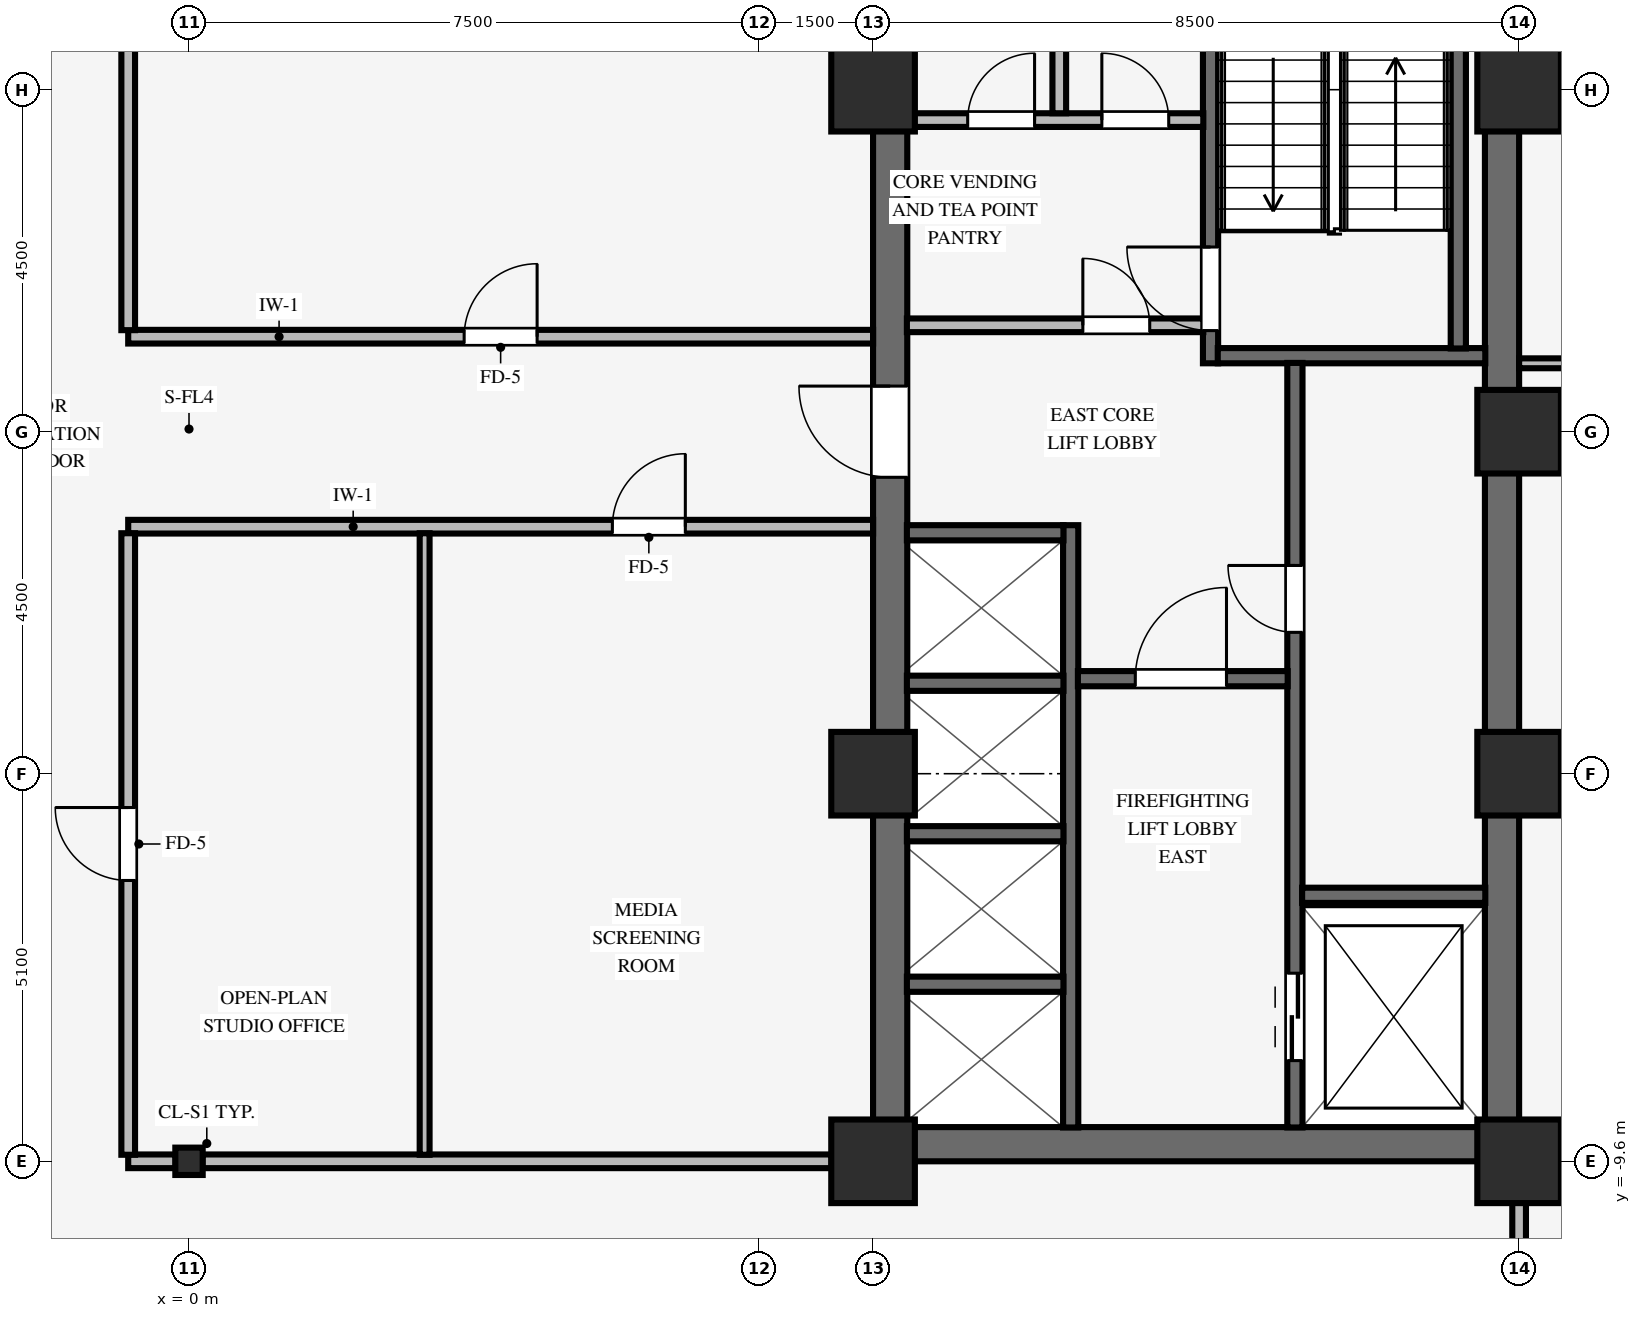
"""IFC4 building model, lengths in metres.
Left out: names, types, materials, properties, quantities, classifications, styles, units other than length and angle.
Written with IfcOpenShell. Run it as: python <this file> out.ifc"""

import sys

from ifc_helpers import new_model, si_unit, direction, frame, frame_2d, origin, origin_2d, place, context, subcontext, project, spatial, rectangle, i_section, extrude, source, transform, mapped, element, fill, save


model = new_model("IFC4")
c1 = context("Model", 3, precision=1e-05, world=origin(), true_north=direction((0.0, 1.0)))
c2 = subcontext(c1, "Body", "Model", "MODEL_VIEW")
j1 = project(units=[si_unit("LENGTHUNIT", "METRE"), si_unit("PLANEANGLEUNIT", "RADIAN")], contexts=[c1])
p1 = place(None, origin())
s1 = spatial("IfcSite", under=j1, at=p1, CompositionType="ELEMENT")
p2 = place(p1, origin())
s2 = spatial("IfcBuilding", under=s1, at=p2, CompositionType="ELEMENT")
p3 = place(p2, frame((0.0, 0.0, 64.1)))
s3 = spatial("IfcBuildingStorey", under=s2, at=p3, CompositionType="ELEMENT", Elevation=64.1)
p4 = place(p3, frame((9.0, -9.375, 0.0), z_axis=(0.0, 0.0, 1.0), x_axis=(1.0, 0.0, 0.0)))
e1 = element("IfcWall", 1, at=p4, inside=s3, PredefinedType="SHEAR", context=c2, shape_type="SweptSolid", body=[
    extrude(rectangle(XDim=8.5, YDim=0.45, at=frame_2d((4.25, 0.0))), origin(), (0.0, 0.0, 1.0), 3.37),
])
p5 = place(p3, frame((9.225, -9.155, 0.0), z_axis=(0.0, 0.0, 1.0), x_axis=(0.0, 1.0, 0.0)))
e2 = element("IfcWall", 2, at=p5, inside=s3, PredefinedType="SHEAR", context=c2, shape_type="SweptSolid", body=[
    extrude(rectangle(XDim=18.31, YDim=0.45, at=frame_2d((9.155, 0.0))), origin(), (0.0, 0.0, 1.0), 3.37),
])
p6 = place(p5, frame((8.555, 0.0, 0.0)))
e3 = element("IfcOpeningElement", 3, at=p6, cuts=e2, PredefinedType="OPENING", context=c2, shape_type="SweptSolid", body=[
    extrude(rectangle(XDim=1.2, YDim=2.15, at=frame_2d((0.6, 1.075))), frame((0.0, 0.235, 0.0), z_axis=(0.0, -1.0, 0.0), x_axis=(1.0, 0.0, 0.0)), (0.0, 0.0, 1.0), 0.47),
])
p7 = place(p3, frame((17.275, -9.155, 0.0), z_axis=(0.0, 0.0, 1.0), x_axis=(0.0, 1.0, 0.0)))
e4 = element("IfcWall", 4, at=p7, inside=s3, PredefinedType="SHEAR", context=c2, shape_type="SweptSolid", body=[
    extrude(rectangle(XDim=18.31, YDim=0.45, at=frame_2d((9.155, 0.0))), origin(), (0.0, 0.0, 1.0), 3.37),
])
for number, where, z_axis, x_axis in (
    (5, (9.0, -9.6, 0.0), (0.0, 0.0, 1.0), (1.0, 0.0, 0.0)),
    (6, (9.0, -4.5, 0.0), (0.0, 0.0, 1.0), (1.0, 0.0, 0.0)),
    (7, (9.0, 4.5, 0.0), (0.0, 0.0, 1.0), (1.0, 0.0, 0.0)),
    (8, (17.5, -9.6, 0.0), (0.0, 0.0, 1.0), (1.0, 0.0, 0.0)),
    (9, (17.5, -4.5, 0.0), (0.0, 0.0, 1.0), (1.0, 0.0, 0.0)),
    (10, (17.5, 4.5, 0.0), (0.0, 0.0, 1.0), (1.0, 0.0, 0.0)),
    (11, (17.5, 0.0, 0.0), (0.0, 0.0, 1.0), (1.0, 0.0, 0.0)),
):
    element("IfcColumn", number, at=place(p3, frame(where, z_axis=z_axis, x_axis=x_axis)), inside=s3, PredefinedType="COLUMN", context=c2, shape_type="SweptSolid", body=[
        extrude(rectangle(XDim=1.1, YDim=1.1, at=origin_2d()), origin(), (0.0, 0.0, 1.0), 3.37),
    ])
p8 = place(p3, frame((0.0, -9.6, 0.0), z_axis=(0.0, 0.0, 1.0), x_axis=(1.0, 0.0, 0.0)))
e12 = element("IfcColumn", 12, at=p8, inside=s3, PredefinedType="COLUMN", context=c2, shape_type="SweptSolid", body=[
    extrude(i_section(OverallWidth=0.36, OverallDepth=0.36, WebThickness=0.021, FlangeThickness=0.021, FilletRadius=0.018, at=origin_2d()), origin(), (0.0, 0.0, 1.0), 3.37),
])
p9 = place(p3, frame((13.44, 0.9, 0.0), z_axis=(0.0, 0.0, 1.0), x_axis=(0.0, 1.0, 0.0)))
e13 = element("IfcWall", 13, at=p9, inside=s3, PredefinedType="SHEAR", context=c2, shape_type="SweptSolid", body=[
    extrude(rectangle(XDim=8.255, YDim=0.2, at=frame_2d((4.127, 0.0))), origin(), (0.0, 0.0, 1.0), 3.37),
])
p10 = place(p9, frame((0.43, 0.0, 0.0)))
e14 = element("IfcOpeningElement", 14, at=p10, cuts=e13, PredefinedType="OPENING", context=c2, shape_type="SweptSolid", body=[
    extrude(rectangle(XDim=1.1, YDim=2.15, at=frame_2d((0.55, 1.075))), frame((0.0, 0.11, 0.0), z_axis=(0.0, -1.0, 0.0), x_axis=(1.0, 0.0, 0.0)), (0.0, 0.0, 1.0), 0.22),
])
p11 = place(p3, frame((13.535, 1.0, 0.0), z_axis=(0.0, 0.0, 1.0), x_axis=(1.0, 0.0, 0.0)))
e15 = element("IfcWall", 15, at=p11, inside=s3, PredefinedType="SHEAR", context=c2, shape_type="SweptSolid", body=[
    extrude(rectangle(XDim=3.52, YDim=0.2, at=frame_2d((1.76, 0.0))), origin(), (0.0, 0.0, 1.0), 3.37),
])
p12 = place(p3, frame((16.7, 1.095, 0.0), z_axis=(0.0, 0.0, 1.0), x_axis=(0.0, 1.0, 0.0)))
e16 = element("IfcWall", 16, at=p12, inside=s3, PredefinedType="SHEAR", context=c2, shape_type="SweptSolid", body=[
    extrude(rectangle(XDim=8.06, YDim=0.2, at=frame_2d((4.03, 0.0))), origin(), (0.0, 0.0, 1.0), 3.37),
])
p13 = place(p3, frame((14.55, -9.155, 0.0), z_axis=(0.0, 0.0, 1.0), x_axis=(0.0, 1.0, 0.0)))
e17 = element("IfcWall", 17, at=p13, inside=s3, PredefinedType="SHEAR", context=c2, shape_type="SweptSolid", body=[
    extrude(rectangle(XDim=10.06, YDim=0.2, at=frame_2d((5.03, 0.0))), origin(), (0.0, 0.0, 1.0), 3.37),
])
p14 = place(p13, frame((6.515, 0.0, 0.0)))
e18 = element("IfcOpeningElement", 18, at=p14, cuts=e17, PredefinedType="OPENING", context=c2, shape_type="SweptSolid", body=[
    extrude(rectangle(XDim=0.88, YDim=2.1, at=frame_2d((0.44, 1.05))), frame((0.0, 0.11, 0.0), z_axis=(0.0, -1.0, 0.0), x_axis=(1.0, 0.0, 0.0)), (0.0, 0.0, 1.0), 0.22),
])
p15 = place(p13, frame((0.88, 0.0, 0.0)))
e19 = element("IfcOpeningElement", 19, at=p15, cuts=e17, PredefinedType="OPENING", context=c2, shape_type="SweptSolid", body=[
    extrude(rectangle(XDim=1.15, YDim=2.15, at=frame_2d((0.575, 1.075))), frame((0.0, 0.11, 0.0), z_axis=(0.0, -1.0, 0.0), x_axis=(1.0, 0.0, 0.0)), (0.0, 0.0, 1.0), 0.22),
])
p16 = place(p3, frame((14.645, -6.1, 0.0), z_axis=(0.0, 0.0, 1.0), x_axis=(1.0, 0.0, 0.0)))
e20 = element("IfcWall", 20, at=p16, inside=s3, PredefinedType="SHEAR", context=c2, shape_type="SweptSolid", body=[
    extrude(rectangle(XDim=2.41, YDim=0.2, at=frame_2d((1.205, 0.0))), origin(), (0.0, 0.0, 1.0), 3.37),
])
p17 = place(p3, frame((11.6, -9.155, 0.0), z_axis=(0.0, 0.0, 1.0), x_axis=(0.0, 1.0, 0.0)))
e21 = element("IfcWall", 21, at=p17, inside=s3, PredefinedType="SHEAR", context=c2, shape_type="SweptSolid", body=[
    extrude(rectangle(XDim=7.925, YDim=0.2, at=frame_2d((3.962, 0.0))), origin(), (0.0, 0.0, 1.0), 3.37),
])
p18 = place(p3, frame((11.695, -3.25, 0.0), z_axis=(0.0, 0.0, 1.0), x_axis=(1.0, 0.0, 0.0)))
e22 = element("IfcWall", 22, at=p18, inside=s3, PredefinedType="SHEAR", context=c2, shape_type="SweptSolid", body=[
    extrude(rectangle(XDim=2.76, YDim=0.2, at=frame_2d((1.38, 0.0))), origin(), (0.0, 0.0, 1.0), 3.37),
])
p19 = place(p18, frame((0.755, 0.0, 0.0)))
e23 = element("IfcOpeningElement", 23, at=p19, cuts=e22, PredefinedType="OPENING", context=c2, shape_type="SweptSolid", body=[
    extrude(rectangle(XDim=1.2, YDim=2.15, at=frame_2d((0.6, 1.075))), frame((0.0, 0.11, 0.0), z_axis=(0.0, -1.0, 0.0), x_axis=(1.0, 0.0, 0.0)), (0.0, 0.0, 1.0), 0.22),
])
for number, where, z_axis, x_axis in (
    (24, (9.445, -7.27, 0.0), (0.0, 0.0, 1.0), (1.0, 0.0, 0.0)),
    (25, (9.445, -5.29, 0.0), (0.0, 0.0, 1.0), (1.0, 0.0, 0.0)),
    (26, (9.445, -3.31, 0.0), (0.0, 0.0, 1.0), (1.0, 0.0, 0.0)),
    (27, (9.445, -1.33, 0.0), (0.0, 0.0, 1.0), (1.0, 0.0, 0.0)),
):
    element("IfcWall", number, at=place(p3, frame(where, z_axis=z_axis, x_axis=x_axis)), inside=s3, PredefinedType="SHEAR", context=c2, shape_type="SweptSolid", body=[
        extrude(rectangle(XDim=2.06, YDim=0.2, at=frame_2d((1.03, 0.0))), origin(), (0.0, 0.0, 1.0), 3.37),
    ])
p20 = place(p3, frame((9.445, 1.4, 0.0), z_axis=(0.0, 0.0, 1.0), x_axis=(1.0, 0.0, 0.0)))
e28 = element("IfcWall", 28, at=p20, inside=s3, PredefinedType="PARTITIONING", context=c2, shape_type="SweptSolid", body=[
    extrude(rectangle(XDim=3.9, YDim=0.18, at=frame_2d((1.95, 0.0))), origin(), (0.0, 0.0, 1.0), 3.36),
])
p21 = place(p20, frame((2.315, 0.0, 0.0)))
e29 = element("IfcOpeningElement", 29, at=p21, cuts=e28, PredefinedType="OPENING", context=c2, shape_type="SweptSolid", body=[
    extrude(rectangle(XDim=0.88, YDim=2.1, at=frame_2d((0.44, 1.05))), frame((0.0, 0.1, 0.0), z_axis=(0.0, -1.0, 0.0), x_axis=(1.0, 0.0, 0.0)), (0.0, 0.0, 1.0), 0.2),
])
p22 = place(p3, frame((9.445, 4.1, 0.0), z_axis=(0.0, 0.0, 1.0), x_axis=(1.0, 0.0, 0.0)))
e30 = element("IfcWall", 30, at=p22, inside=s3, PredefinedType="PARTITIONING", context=c2, shape_type="SweptSolid", body=[
    extrude(rectangle(XDim=3.9, YDim=0.18, at=frame_2d((1.95, 0.0))), origin(), (0.0, 0.0, 1.0), 3.36),
])
p23 = place(p22, frame((0.8, 0.0, 0.0)))
e31 = element("IfcOpeningElement", 31, at=p23, cuts=e30, PredefinedType="OPENING", context=c2, shape_type="SweptSolid", body=[
    extrude(rectangle(XDim=0.88, YDim=2.1, at=frame_2d((0.44, 1.05))), frame((0.0, 0.1, 0.0), z_axis=(0.0, -1.0, 0.0), x_axis=(1.0, 0.0, 0.0)), (0.0, 0.0, 1.0), 0.2),
])
p24 = place(p22, frame((2.565, 0.0, 0.0)))
e32 = element("IfcOpeningElement", 32, at=p24, cuts=e30, PredefinedType="OPENING", context=c2, shape_type="SweptSolid", body=[
    extrude(rectangle(XDim=0.88, YDim=2.1, at=frame_2d((0.44, 1.05))), frame((0.0, 0.1, 0.0), z_axis=(0.0, -1.0, 0.0), x_axis=(1.0, 0.0, 0.0)), (0.0, 0.0, 1.0), 0.2),
])
p25 = place(p3, frame((11.45, 4.19, 0.0), z_axis=(0.0, 0.0, 1.0), x_axis=(0.0, 1.0, 0.0)))
e33 = element("IfcWall", 33, at=p25, inside=s3, PredefinedType="PARTITIONING", context=c2, shape_type="SweptSolid", body=[
    extrude(rectangle(XDim=4.965, YDim=0.18, at=frame_2d((2.482, 0.0))), origin(), (0.0, 0.0, 1.0), 3.36),
])
p26 = place(p3, frame((-0.8, -9.6, 0.0), z_axis=(0.0, 0.0, 1.0), x_axis=(1.0, 0.0, 0.0)))
e34 = element("IfcWall", 34, at=p26, inside=s3, PredefinedType="PARTITIONING", context=c2, shape_type="SweptSolid", body=[
    extrude(rectangle(XDim=0.624, YDim=0.18, at=frame_2d((0.312, 0.0))), origin(), (0.0, 0.0, 1.0), 2.405),
])
p27 = place(p3, frame((0.176, -9.6, 0.0), z_axis=(0.0, 0.0, 1.0), x_axis=(1.0, 0.0, 0.0)))
e35 = element("IfcWall", 35, at=p27, inside=s3, PredefinedType="PARTITIONING", context=c2, shape_type="SweptSolid", body=[
    extrude(rectangle(XDim=8.278, YDim=0.18, at=frame_2d((4.139, 0.0))), origin(), (0.0, 0.0, 1.0), 2.405),
])
p28 = place(p3, frame((-0.8, -1.25, 0.0), z_axis=(0.0, 0.0, 1.0), x_axis=(1.0, 0.0, 0.0)))
e36 = element("IfcWall", 36, at=p28, inside=s3, PredefinedType="PARTITIONING", context=c2, shape_type="SweptSolid", body=[
    extrude(rectangle(XDim=9.8, YDim=0.18, at=frame_2d((4.9, 0.0))), origin(), (0.0, 0.0, 1.0), 3.36),
])
p29 = place(p28, frame((6.37, 0.0, 0.0)))
e37 = element("IfcOpeningElement", 37, at=p29, cuts=e36, PredefinedType="OPENING", context=c2, shape_type="SweptSolid", body=[
    extrude(rectangle(XDim=0.96, YDim=2.1, at=frame_2d((0.48, 1.05))), frame((0.0, 0.1, 0.0), z_axis=(0.0, -1.0, 0.0), x_axis=(1.0, 0.0, 0.0)), (0.0, 0.0, 1.0), 0.2),
])
p30 = place(p3, frame((17.5, 0.9, 0.0), z_axis=(0.0, 0.0, 1.0), x_axis=(1.0, 0.0, 0.0)))
e38 = element("IfcWall", 38, at=p30, inside=s3, PredefinedType="PARTITIONING", context=c2, shape_type="SweptSolid", body=[
    extrude(rectangle(XDim=3.66, YDim=0.13, at=frame_2d((1.83, 0.0))), origin(), (0.0, 0.0, 1.0), 3.36),
])
p31 = place(p3, frame((-0.8, 1.25, 0.0), z_axis=(0.0, 0.0, 1.0), x_axis=(1.0, 0.0, 0.0)))
e39 = element("IfcWall", 39, at=p31, inside=s3, PredefinedType="PARTITIONING", context=c2, shape_type="SweptSolid", body=[
    extrude(rectangle(XDim=9.8, YDim=0.18, at=frame_2d((4.9, 0.0))), origin(), (0.0, 0.0, 1.0), 3.36),
])
p32 = place(p31, frame((4.42, 0.0, 0.0)))
e40 = element("IfcOpeningElement", 40, at=p32, cuts=e39, PredefinedType="OPENING", context=c2, shape_type="SweptSolid", body=[
    extrude(rectangle(XDim=0.96, YDim=2.1, at=frame_2d((0.48, 1.05))), frame((0.0, 0.1, 0.0), z_axis=(0.0, -1.0, 0.0), x_axis=(1.0, 0.0, 0.0)), (0.0, 0.0, 1.0), 0.2),
])
p33 = place(p3, frame((-0.8, -9.514, 0.0), z_axis=(0.0, 0.0, 1.0), x_axis=(0.0, 1.0, 0.0)))
e41 = element("IfcWall", 41, at=p33, inside=s3, PredefinedType="PARTITIONING", context=c2, shape_type="SweptSolid", body=[
    extrude(rectangle(XDim=8.178, YDim=0.18, at=frame_2d((4.089, 0.0))), origin(), (0.0, 0.0, 1.0), 3.36),
])
p34 = place(p33, frame((3.609, 0.0, 0.0)))
e42 = element("IfcOpeningElement", 42, at=p34, cuts=e41, PredefinedType="OPENING", context=c2, shape_type="SweptSolid", body=[
    extrude(rectangle(XDim=0.96, YDim=2.1, at=frame_2d((0.48, 1.05))), frame((0.0, 0.1, 0.0), z_axis=(0.0, -1.0, 0.0), x_axis=(1.0, 0.0, 0.0)), (0.0, 0.0, 1.0), 0.2),
])
p35 = place(p3, frame((-0.8, 1.336, 0.0), z_axis=(0.0, 0.0, 1.0), x_axis=(0.0, 1.0, 0.0)))
e43 = element("IfcWall", 43, at=p35, inside=s3, PredefinedType="PARTITIONING", context=c2, shape_type="SweptSolid", body=[
    extrude(rectangle(XDim=8.178, YDim=0.18, at=frame_2d((4.089, 0.0))), origin(), (0.0, 0.0, 1.0), 3.36),
])
p36 = place(p3, frame((3.1, -9.514, 0.0), z_axis=(0.0, 0.0, 1.0), x_axis=(0.0, 1.0, 0.0)))
e44 = element("IfcWall", 44, at=p36, inside=s3, PredefinedType="PARTITIONING", context=c2, shape_type="SweptSolid", body=[
    extrude(rectangle(XDim=8.178, YDim=0.13, at=frame_2d((4.089, 0.0))), origin(), (0.0, 0.0, 1.0), 3.36),
])
p37 = place(p3, frame((17.5, -11.114, 0.0), z_axis=(0.0, 0.0, 1.0), x_axis=(0.0, 1.0, 0.0)))
e45 = element("IfcWall", 45, at=p37, inside=s3, PredefinedType="PARTITIONING", context=c2, shape_type="SweptSolid", body=[
    extrude(rectangle(XDim=0.968, YDim=0.18, at=frame_2d((0.484, 0.0))), origin(), (0.0, 0.0, 1.0), 2.738),
])
m1 = source(origin(), c2, "Body", "SweptSolid", [
    extrude(rectangle(XDim=1.1, YDim=2.15, at=frame_2d((0.55, 1.075))), frame((0.0, 0.025, 0.0), z_axis=(0.0, -1.0, 0.0), x_axis=(1.0, 0.0, 0.0)), (0.0, 0.0, 1.0), 0.05),
])
p38 = place(p10, origin())
e46 = element("IfcDoor", 46, at=p38, inside=s3, OperationType="SINGLE_SWING_RIGHT", PredefinedType="DOOR", context=c2, shape_type="MappedRepresentation", body=[
    mapped(m1, transform((0.0, 0.0, 0.0), scale=1.0)),
])
fill(e14, e46)
m2 = source(origin(), c2, "Body", "SweptSolid", [
    extrude(rectangle(XDim=0.88, YDim=2.1, at=frame_2d((0.44, 1.05))), frame((0.0, 0.025, 0.0), z_axis=(0.0, -1.0, 0.0), x_axis=(1.0, 0.0, 0.0)), (0.0, 0.0, 1.0), 0.05),
])
p39 = place(p14, origin())
e47 = element("IfcDoor", 47, at=p39, inside=s3, OperationType="SINGLE_SWING_RIGHT", PredefinedType="DOOR", context=c2, shape_type="MappedRepresentation", body=[
    mapped(m2, transform((0.0, 0.0, 0.0), scale=1.0)),
])
fill(e18, e47)
m3 = source(origin(), c2, "Body", "SweptSolid", [
    extrude(rectangle(XDim=1.2, YDim=2.15, at=frame_2d((0.6, 1.075))), frame((0.0, 0.025, 0.0), z_axis=(0.0, -1.0, 0.0), x_axis=(1.0, 0.0, 0.0)), (0.0, 0.0, 1.0), 0.05),
])
p40 = place(p19, origin())
e48 = element("IfcDoor", 48, at=p40, inside=s3, OperationType="SINGLE_SWING_RIGHT", PredefinedType="DOOR", context=c2, shape_type="MappedRepresentation", body=[
    mapped(m3, transform((0.0, 0.0, 0.0), scale=1.0)),
])
fill(e23, e48)
p41 = place(p6, origin())
e49 = element("IfcDoor", 49, at=p41, inside=s3, OperationType="SINGLE_SWING_RIGHT", PredefinedType="DOOR", context=c2, shape_type="MappedRepresentation", body=[
    mapped(m3, transform((0.0, 0.0, 0.0), scale=1.0)),
])
fill(e3, e49)
p42 = place(p21, origin())
e50 = element("IfcDoor", 50, at=p42, inside=s3, OperationType="SINGLE_SWING_LEFT", PredefinedType="DOOR", context=c2, shape_type="MappedRepresentation", body=[
    mapped(m2, transform((0.0, 0.0, 0.0), scale=1.0)),
])
fill(e29, e50)
p43 = place(p23, origin())
e51 = element("IfcDoor", 51, at=p43, inside=s3, OperationType="SINGLE_SWING_RIGHT", PredefinedType="DOOR", context=c2, shape_type="MappedRepresentation", body=[
    mapped(m2, transform((0.0, 0.0, 0.0), scale=1.0)),
])
fill(e31, e51)
p44 = place(p24, origin())
e52 = element("IfcDoor", 52, at=p44, inside=s3, OperationType="SINGLE_SWING_LEFT", PredefinedType="DOOR", context=c2, shape_type="MappedRepresentation", body=[
    mapped(m2, transform((0.0, 0.0, 0.0), scale=1.0)),
])
fill(e32, e52)
m4 = source(origin(), c2, "Body", "SweptSolid", [
    extrude(rectangle(XDim=1.15, YDim=2.15, at=frame_2d((0.575, 1.075))), frame((0.0, 0.025, 0.0), z_axis=(0.0, -1.0, 0.0), x_axis=(1.0, 0.0, 0.0)), (0.0, 0.0, 1.0), 0.05),
])
p45 = place(p15, origin())
e53 = element("IfcDoor", 53, at=p45, inside=s3, OperationType="DOUBLE_DOOR_SLIDING", PredefinedType="DOOR", context=c2, shape_type="MappedRepresentation", body=[
    mapped(m4, transform((0.0, 0.0, 0.0), scale=1.0)),
])
fill(e19, e53)
m5 = source(origin(), c2, "Body", "SweptSolid", [
    extrude(rectangle(XDim=0.96, YDim=2.1, at=frame_2d((0.48, 1.05))), frame((0.0, 0.025, 0.0), z_axis=(0.0, -1.0, 0.0), x_axis=(1.0, 0.0, 0.0)), (0.0, 0.0, 1.0), 0.05),
])
p46 = place(p32, origin())
e54 = element("IfcDoor", 54, at=p46, inside=s3, OperationType="SINGLE_SWING_RIGHT", PredefinedType="DOOR", context=c2, shape_type="MappedRepresentation", body=[
    mapped(m5, transform((0.0, 0.0, 0.0), scale=1.0)),
])
fill(e40, e54)
p47 = place(p34, origin())
e55 = element("IfcDoor", 55, at=p47, inside=s3, OperationType="SINGLE_SWING_RIGHT", PredefinedType="DOOR", context=c2, shape_type="MappedRepresentation", body=[
    mapped(m5, transform((0.0, 0.0, 0.0), scale=1.0)),
])
fill(e42, e55)
p48 = place(p29, origin())
e56 = element("IfcDoor", 56, at=p48, inside=s3, OperationType="SINGLE_SWING_RIGHT", PredefinedType="DOOR", context=c2, shape_type="MappedRepresentation", body=[
    mapped(m5, transform((0.0, 0.0, 0.0), scale=1.0)),
])
fill(e37, e56)
save(model, sys.argv[1])
